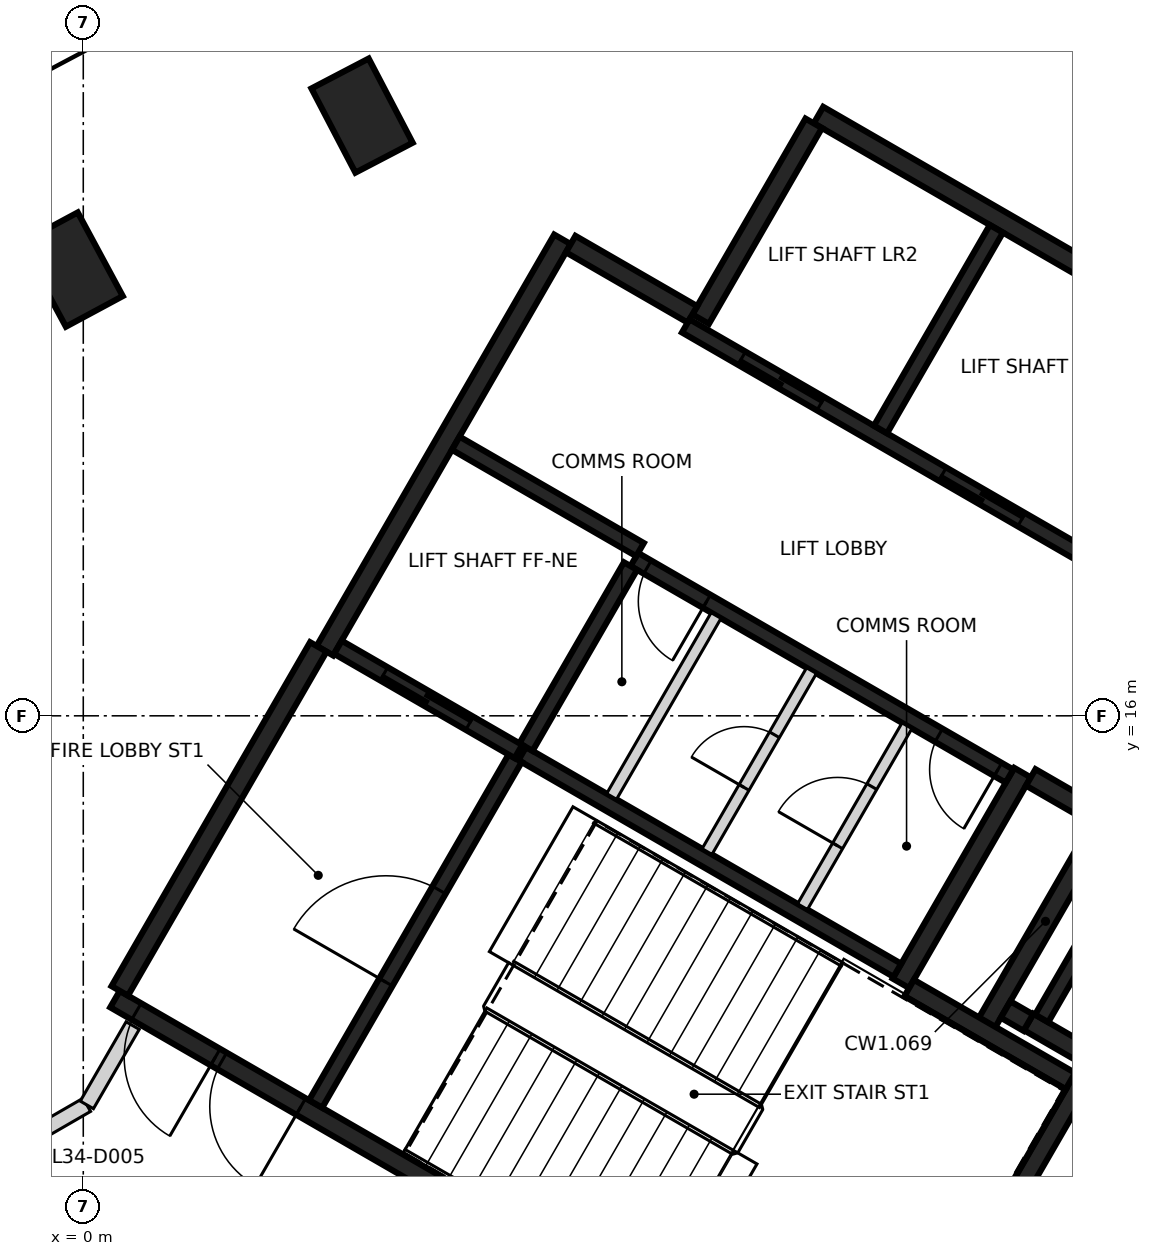
"""IFC4 building model, lengths in metres.
Left out: names, types, materials, properties, quantities, classifications, styles, units other than length and angle.
Written with IfcOpenShell. Run it as: python <this file> out.ifc"""

import sys

from ifc_helpers import new_model, si_unit, direction, frame, frame_2d, origin, origin_2d, place, context, subcontext, project, spatial, rectangle, extrude, element, fill, save


model = new_model("IFC4")
c1 = context("Model", 3, precision=1e-05, world=origin(), true_north=direction((0.0, 1.0)))
c2 = subcontext(c1, "Body", "Model", "MODEL_VIEW")
j1 = project(units=[si_unit("LENGTHUNIT", "METRE"), si_unit("PLANEANGLEUNIT", "RADIAN")], contexts=[c1])
p1 = place(None, origin())
s1 = spatial("IfcSite", under=j1, at=p1, CompositionType="ELEMENT")
p2 = place(p1, origin())
s2 = spatial("IfcBuilding", under=s1, at=p2, CompositionType="ELEMENT")
p3 = place(p2, frame((0.0, 0.0, 139.6)))
s3 = spatial("IfcBuildingStorey", under=s2, at=p3, CompositionType="ELEMENT", Elevation=139.6)
for number, where, z_axis, x_axis in (
    (1, (3.667, 23.896, -0.4), (0.0, 0.0, 1.0), (-0.463, 0.886, 0.0)),
    (2, (-0.151, 21.871, -0.4), (0.0, 0.0, 1.0), (-0.474, 0.881, 0.0)),
):
    element("IfcColumn", number, at=place(p3, frame(where, z_axis=z_axis, x_axis=x_axis)), inside=s3, PredefinedType="COLUMN", context=c2, shape_type="SweptSolid", body=[
        extrude(rectangle(XDim=1.25, YDim=0.85, at=origin_2d()), origin(), (0.0, 0.0, 1.0), 3.6),
    ])
p4 = place(p3, frame((15.207, 26.34, -0.4), z_axis=(0.0, 0.0, 1.0), x_axis=(0.5, 0.866025403784, 0.0)))
e3 = element("IfcColumn", 3, at=p4, inside=s3, PredefinedType="COLUMN", context=c2, shape_type="SweptSolid", body=[
    extrude(rectangle(XDim=3.6, YDim=3.0, at=origin_2d()), origin(), (0.0, 0.0, 1.0), 3.6),
])
p5 = place(p3, frame((10.42, 6.498, 0.0), z_axis=(0.0, 0.0, 1.0), x_axis=(-0.866021906294, 0.500006057782, 0.0)))
e4 = element("IfcWall", 4, at=p5, inside=s3, PredefinedType="SHEAR", context=c2, shape_type="SweptSolid", body=[
    extrude(rectangle(XDim=11.55, YDim=0.25, at=frame_2d((5.775, 0.0))), origin(), (0.0, 0.0, 1.0), 3.2),
])
p6 = place(p5, frame((10.025, 0.0, 0.0)))
e5 = element("IfcOpeningElement", 5, at=p6, cuts=e4, PredefinedType="OPENING", context=c2, shape_type="SweptSolid", body=[
    extrude(rectangle(XDim=1.2, YDim=2.1, at=frame_2d((0.6, 1.05))), frame((0.0, 0.135, 0.0), z_axis=(0.0, -1.0, 0.0), x_axis=(1.0, 0.0, 0.0)), (0.0, 0.0, 1.0), 0.27),
])
p7 = place(p5, frame((8.725, 0.0, 0.0)))
e6 = element("IfcOpeningElement", 6, at=p7, cuts=e4, PredefinedType="OPENING", context=c2, shape_type="SweptSolid", body=[
    extrude(rectangle(XDim=1.2, YDim=2.1, at=frame_2d((0.6, 1.05))), frame((0.0, 0.135, 0.0), z_axis=(0.0, -1.0, 0.0), x_axis=(1.0, 0.0, 0.0)), (0.0, 0.0, 1.0), 0.27),
])
p8 = place(p3, frame((3.179, 16.856, 0.0), z_axis=(0.0, 0.0, 1.0), x_axis=(0.500004234368, 0.866022959057, 0.0)))
e7 = element("IfcWall", 7, at=p8, inside=s3, PredefinedType="SHEAR", context=c2, shape_type="SweptSolid", body=[
    extrude(rectangle(XDim=6.25, YDim=0.25, at=frame_2d((3.125, 0.0))), origin(), (0.0, 0.0, 1.0), 3.2),
])
p9 = place(p3, frame((9.673, 23.903, 0.0), z_axis=(0.0, 0.0, 1.0), x_axis=(0.86603616409, -0.499981362141, 0.0)))
e8 = element("IfcWall", 8, at=p9, inside=s3, PredefinedType="SHEAR", context=c2, shape_type="SweptSolid", body=[
    extrude(rectangle(XDim=5.85, YDim=0.25, at=frame_2d((2.925, 0.0))), origin(), (0.0, 0.0, 1.0), 3.2),
])
p10 = place(p3, frame((0.48, 12.381, 0.0), z_axis=(0.0, 0.0, 1.0), x_axis=(0.49999885962, 0.866026062182, 0.0)))
e9 = element("IfcWall", 9, at=p10, inside=s3, PredefinedType="SHEAR", context=c2, shape_type="SweptSolid", body=[
    extrude(rectangle(XDim=5.225, YDim=0.25, at=frame_2d((2.612, 0.0))), origin(), (0.0, 0.0, 1.0), 3.2),
])
p11 = place(p3, frame((13.238, 11.378, 0.0), z_axis=(0.0, 0.0, 1.0), x_axis=(-0.500008851346, -0.866020293397, 0.0)))
e10 = element("IfcWall", 10, at=p11, inside=s3, PredefinedType="SHEAR", context=c2, shape_type="SweptSolid", body=[
    extrude(rectangle(XDim=5.51, YDim=0.25, at=frame_2d((2.755, 0.0))), origin(), (0.0, 0.0, 1.0), 3.2),
])
p12 = place(p3, frame((12.357, 15.252, 0.0), z_axis=(0.0, 0.0, 1.0), x_axis=(-0.500028443584, -0.866008981251, 0.0)))
e11 = element("IfcWall", 11, at=p12, inside=s3, PredefinedType="SHEAR", context=c2, shape_type="SweptSolid", body=[
    extrude(rectangle(XDim=3.2, YDim=0.25, at=frame_2d((1.6, 0.0))), origin(), (0.0, 0.0, 1.0), 3.2),
])
p13 = place(p3, frame((8.123, 21.219, 0.0), z_axis=(0.0, 0.0, 1.0), x_axis=(0.499987686533, 0.866032512851, 0.0)))
e12 = element("IfcWall", 12, at=p13, inside=s3, PredefinedType="SHEAR", context=c2, shape_type="SweptSolid", body=[
    extrude(rectangle(XDim=2.975, YDim=0.25, at=frame_2d((1.487, 0.0))), origin(), (0.0, 0.0, 1.0), 3.2),
])
p14 = place(p3, frame((14.918, 10.54, 0.0), z_axis=(0.0, 0.0, 1.0), x_axis=(-0.866063538972, 0.499933942099, 0.0)))
e13 = element("IfcWall", 13, at=p14, inside=s3, PredefinedType="SHEAR", context=c2, shape_type="SweptSolid", body=[
    extrude(rectangle(XDim=2.865, YDim=0.25, at=frame_2d((1.432, 0.0))), origin(), (0.0, 0.0, 1.0), 3.2),
])
p15 = place(p3, frame((11.888, 11.961, 0.0), z_axis=(0.0, 0.0, 1.0), x_axis=(0.500003324108, 0.866023484601, 0.0)))
e14 = element("IfcWall", 14, at=p15, inside=s3, PredefinedType="SHEAR", context=c2, shape_type="SweptSolid", body=[
    extrude(rectangle(XDim=3.085, YDim=0.25, at=frame_2d((1.542, 0.0))), origin(), (0.0, 0.0, 1.0), 3.2),
])
p16 = place(p3, frame((10.865, 12.418, 0.0), z_axis=(0.0, 0.0, 1.0), x_axis=(0.866026229868, -0.499998569178, 0.0)))
e15 = element("IfcWall", 15, at=p16, inside=s3, PredefinedType="SHEAR", context=c2, shape_type="SweptSolid", body=[
    extrude(rectangle(XDim=2.449, YDim=0.25, at=frame_2d((1.225, 0.0))), origin(), (0.0, 0.0, 1.0), 3.2),
])
p17 = place(p3, frame((6.413, 22.206, 0.0), z_axis=(0.0, 0.0, 1.0), x_axis=(0.866016279763, -0.500015802937, 0.0)))
e16 = element("IfcWall", 16, at=p17, inside=s3, PredefinedType="SHEAR", context=c2, shape_type="SweptSolid", body=[
    extrude(rectangle(XDim=1.849, YDim=0.25, at=frame_2d((0.925, 0.0))), origin(), (0.0, 0.0, 1.0), 3.2),
])
p18 = place(p3, frame((13.322, 14.695, 0.0), z_axis=(0.0, 0.0, 1.0), x_axis=(-0.866017078145, 0.500014420154, 0.0)))
e17 = element("IfcWall", 17, at=p18, inside=s3, PredefinedType="SHEAR", context=c2, shape_type="SweptSolid", body=[
    extrude(rectangle(XDim=0.989, YDim=0.25, at=frame_2d((0.495, 0.0))), origin(), (0.0, 0.0, 1.0), 3.2),
])
p19 = place(p3, frame((12.433, 11.964, 0.0), z_axis=(0.0, 0.0, 1.0), x_axis=(-0.866055875208, 0.499947218231, 0.0)))
e18 = element("IfcWall", 18, at=p19, inside=s3, PredefinedType="SHEAR", context=c2, shape_type="SweptSolid", body=[
    extrude(rectangle(XDim=0.345, YDim=0.25, at=frame_2d((0.172, 0.0))), origin(), (0.0, 0.0, 1.0), 3.2),
])
p20 = place(p3, frame((13.21, 18.08, 0.0), z_axis=(0.0, 0.0, 1.0), x_axis=(-0.866030299012, 0.499991521122, 0.0)))
e19 = element("IfcWall", 19, at=p20, inside=s3, PredefinedType="SHEAR", context=c2, shape_type="SweptSolid", body=[
    extrude(rectangle(XDim=6.1, YDim=0.2, at=frame_2d((3.05, 0.0))), origin(), (0.0, 0.0, 1.0), 3.2),
])
p21 = place(p20, frame((1.0, 0.0, 0.0)))
e20 = element("IfcOpeningElement", 20, at=p21, cuts=e19, PredefinedType="OPENING", context=c2, shape_type="SweptSolid", body=[
    extrude(rectangle(XDim=1.2, YDim=2.1, at=frame_2d((0.6, 1.05))), frame((0.0, 0.11, 0.0), z_axis=(0.0, -1.0, 0.0), x_axis=(1.0, 0.0, 0.0)), (0.0, 0.0, 1.0), 0.22),
])
p22 = place(p20, frame((4.05, 0.0, 0.0)))
e21 = element("IfcOpeningElement", 21, at=p22, cuts=e19, PredefinedType="OPENING", context=c2, shape_type="SweptSolid", body=[
    extrude(rectangle(XDim=1.2, YDim=2.1, at=frame_2d((0.6, 1.05))), frame((0.0, 0.11, 0.0), z_axis=(0.0, -1.0, 0.0), x_axis=(1.0, 0.0, 0.0)), (0.0, 0.0, 1.0), 0.22),
])
p23 = place(p3, frame((5.775, 15.502, 0.0), z_axis=(0.0, 0.0, 1.0), x_axis=(0.866020080793, -0.500009219579, 0.0)))
e22 = element("IfcWall", 22, at=p23, inside=s3, PredefinedType="SHEAR", context=c2, shape_type="SweptSolid", body=[
    extrude(rectangle(XDim=5.699, YDim=0.2, at=frame_2d((2.85, 0.0))), origin(), (0.0, 0.0, 1.0), 3.2),
])
p24 = place(p3, frame((12.185, 15.207, 0.0), z_axis=(0.0, 0.0, 1.0), x_axis=(-0.866020080793, 0.500009219579, 0.0)))
e23 = element("IfcWall", 23, at=p24, inside=s3, PredefinedType="SHEAR", context=c2, shape_type="SweptSolid", body=[
    extrude(rectangle(XDim=5.699, YDim=0.2, at=frame_2d((2.85, 0.0))), origin(), (0.0, 0.0, 1.0), 3.2),
])
p25 = place(p24, frame((0.174, 0.0, 0.0)))
e24 = element("IfcOpeningElement", 24, at=p25, cuts=e23, PredefinedType="OPENING", context=c2, shape_type="SweptSolid", body=[
    extrude(rectangle(XDim=0.9, YDim=2.1, at=frame_2d((0.45, 1.05))), frame((0.0, 0.11, 0.0), z_axis=(0.0, -1.0, 0.0), x_axis=(1.0, 0.0, 0.0)), (0.0, 0.0, 1.0), 0.22),
])
p26 = place(p24, frame((4.599, 0.0, 0.0)))
e25 = element("IfcOpeningElement", 25, at=p26, cuts=e23, PredefinedType="OPENING", context=c2, shape_type="SweptSolid", body=[
    extrude(rectangle(XDim=0.9, YDim=2.1, at=frame_2d((0.45, 1.05))), frame((0.0, 0.11, 0.0), z_axis=(0.0, -1.0, 0.0), x_axis=(1.0, 0.0, 0.0)), (0.0, 0.0, 1.0), 0.22),
])
p27 = place(p3, frame((3.057, 10.895, 0.0), z_axis=(0.0, 0.0, 1.0), x_axis=(0.499989418164, 0.866031513124, 0.0)))
e26 = element("IfcWall", 26, at=p27, inside=s3, PredefinedType="SHEAR", context=c2, shape_type="SweptSolid", body=[
    extrude(rectangle(XDim=5.251, YDim=0.2, at=frame_2d((2.625, 0.0))), origin(), (0.0, 0.0, 1.0), 3.2),
])
p28 = place(p27, frame((1.849, 0.0, 0.0)))
e27 = element("IfcOpeningElement", 27, at=p28, cuts=e26, PredefinedType="OPENING", context=c2, shape_type="SweptSolid", body=[
    extrude(rectangle(XDim=1.4, YDim=2.1, at=frame_2d((0.7, 1.05))), frame((0.0, 0.11, 0.0), z_axis=(0.0, -1.0, 0.0), x_axis=(1.0, 0.0, 0.0)), (0.0, 0.0, 1.0), 0.22),
])
p29 = place(p3, frame((10.489, 19.767, 0.0), z_axis=(0.0, 0.0, 1.0), x_axis=(0.499946628782, 0.866056215479, 0.0)))
e28 = element("IfcWall", 28, at=p29, inside=s3, PredefinedType="SHEAR", context=c2, shape_type="SweptSolid", body=[
    extrude(rectangle(XDim=3.048, YDim=0.2, at=frame_2d((1.524, 0.0))), origin(), (0.0, 0.0, 1.0), 3.2),
])
p30 = place(p3, frame((14.008, 14.442, 0.0), z_axis=(0.0, 0.0, 1.0), x_axis=(-0.499986818241, -0.866033014143, 0.0)))
e29 = element("IfcWall", 29, at=p30, inside=s3, PredefinedType="SHEAR", context=c2, shape_type="SweptSolid", body=[
    extrude(rectangle(XDim=2.798, YDim=0.2, at=frame_2d((1.399, 0.0))), origin(), (0.0, 0.0, 1.0), 3.2),
])
p31 = place(p30, frame((0.949, 0.0, 0.0)))
e30 = element("IfcOpeningElement", 30, at=p31, cuts=e29, PredefinedType="OPENING", context=c2, shape_type="SweptSolid", body=[
    extrude(rectangle(XDim=0.9, YDim=2.1, at=frame_2d((0.45, 1.05))), frame((0.0, 0.11, 0.0), z_axis=(0.0, -1.0, 0.0), x_axis=(1.0, 0.0, 0.0)), (0.0, 0.0, 1.0), 0.22),
])
p32 = place(p3, frame((7.199, 17.97, 0.0), z_axis=(0.0, 0.0, 1.0), x_axis=(-0.499968400327, -0.866043647095, 0.0)))
e31 = element("IfcWall", 31, at=p32, inside=s3, PredefinedType="SHEAR", context=c2, shape_type="SweptSolid", body=[
    extrude(rectangle(XDim=2.75, YDim=0.2, at=frame_2d((1.375, 0.0))), origin(), (0.0, 0.0, 1.0), 3.2),
])
p33 = place(p3, frame((5.725, 15.531, 0.0), z_axis=(0.0, 0.0, 1.0), x_axis=(-0.866037306777, 0.499979382845, 0.0)))
e32 = element("IfcWall", 32, at=p33, inside=s3, PredefinedType="SHEAR", context=c2, shape_type="SweptSolid", body=[
    extrude(rectangle(XDim=2.742, YDim=0.2, at=frame_2d((1.371, 0.0))), origin(), (0.0, 0.0, 1.0), 3.2),
])
p34 = place(p33, frame((0.743, 0.0, 0.0)))
e33 = element("IfcOpeningElement", 33, at=p34, cuts=e32, PredefinedType="OPENING", context=c2, shape_type="SweptSolid", body=[
    extrude(rectangle(XDim=1.3, YDim=2.1, at=frame_2d((0.65, 1.05))), frame((0.0, 0.11, 0.0), z_axis=(0.0, -1.0, 0.0), x_axis=(1.0, 0.0, 0.0)), (0.0, 0.0, 1.0), 0.22),
])
p35 = place(p3, frame((4.901, 19.586, 0.0), z_axis=(0.0, 0.0, 1.0), x_axis=(0.866022890907, -0.500004352405, 0.0)))
e34 = element("IfcWall", 34, at=p35, inside=s3, PredefinedType="SHEAR", context=c2, shape_type="SweptSolid", body=[
    extrude(rectangle(XDim=2.799, YDim=0.2, at=frame_2d((1.399, 0.0))), origin(), (0.0, 0.0, 1.0), 3.2),
])
p36 = place(p3, frame((9.462, 13.489, 0.0), z_axis=(0.0, 0.0, 1.0), x_axis=(0.50002746344, 0.86600954718, 0.0)))
e35 = element("IfcWall", 35, at=p36, inside=s3, PredefinedType="PARTITIONING", context=c2, shape_type="SweptSolid", body=[
    extrude(rectangle(XDim=2.748, YDim=0.15, at=frame_2d((1.374, 0.0))), origin(), (0.0, 0.0, 1.0), 3.2),
])
p37 = place(p36, frame((0.924, 0.0, 0.0)))
e36 = element("IfcOpeningElement", 36, at=p37, cuts=e35, PredefinedType="OPENING", context=c2, shape_type="SweptSolid", body=[
    extrude(rectangle(XDim=0.9, YDim=2.1, at=frame_2d((0.45, 1.05))), frame((0.0, 0.085, 0.0), z_axis=(0.0, -1.0, 0.0), x_axis=(1.0, 0.0, 0.0)), (0.0, 0.0, 1.0), 0.17),
])
p38 = place(p3, frame((8.207, 14.214, 0.0), z_axis=(0.0, 0.0, 1.0), x_axis=(0.499922376475, 0.866070215109, 0.0)))
e37 = element("IfcWall", 37, at=p38, inside=s3, PredefinedType="PARTITIONING", context=c2, shape_type="SweptSolid", body=[
    extrude(rectangle(XDim=2.749, YDim=0.15, at=frame_2d((1.374, 0.0))), origin(), (0.0, 0.0, 1.0), 3.2),
])
p39 = place(p38, frame((0.974, 0.0, 0.0)))
e38 = element("IfcOpeningElement", 38, at=p39, cuts=e37, PredefinedType="OPENING", context=c2, shape_type="SweptSolid", body=[
    extrude(rectangle(XDim=0.8, YDim=2.1, at=frame_2d((0.4, 1.05))), frame((0.0, 0.085, 0.0), z_axis=(0.0, -1.0, 0.0), x_axis=(1.0, 0.0, 0.0)), (0.0, 0.0, 1.0), 0.17),
])
p40 = place(p3, frame((6.951, 14.939, 0.0), z_axis=(0.0, 0.0, 1.0), x_axis=(0.50002746344, 0.86600954718, 0.0)))
e39 = element("IfcWall", 39, at=p40, inside=s3, PredefinedType="PARTITIONING", context=c2, shape_type="SweptSolid", body=[
    extrude(rectangle(XDim=2.748, YDim=0.15, at=frame_2d((1.374, 0.0))), origin(), (0.0, 0.0, 1.0), 3.2),
])
p41 = place(p3, frame((-8.161, 6.142, 0.0), z_axis=(0.0, 0.0, 1.0), x_axis=(0.865927304867, 0.500169873828, 0.0)))
e40 = element("IfcWall", 40, at=p41, inside=s3, PredefinedType="PARTITIONING", context=c2, shape_type="SweptSolid", body=[
    extrude(rectangle(XDim=9.478, YDim=0.2, at=frame_2d((4.739, 0.0))), origin(), (0.0, 0.0, 1.0), 3.2),
])
p42 = place(p41, frame((4.851, 0.0, 0.0)))
e41 = element("IfcOpeningElement", 41, at=p42, cuts=e40, PredefinedType="OPENING", context=c2, shape_type="SweptSolid", body=[
    extrude(rectangle(XDim=1.0, YDim=2.1, at=frame_2d((0.5, 1.05))), frame((0.0, 0.11, 0.0), z_axis=(0.0, -1.0, 0.0), x_axis=(1.0, 0.0, 0.0)), (0.0, 0.0, 1.0), 0.22),
])
p43 = place(p41, frame((7.583, 0.0, 0.0)))
e42 = element("IfcOpeningElement", 42, at=p43, cuts=e40, PredefinedType="OPENING", context=c2, shape_type="SweptSolid", body=[
    extrude(rectangle(XDim=1.0, YDim=2.1, at=frame_2d((0.5, 1.05))), frame((0.0, 0.11, 0.0), z_axis=(0.0, -1.0, 0.0), x_axis=(1.0, 0.0, 0.0)), (0.0, 0.0, 1.0), 0.22),
])
p44 = place(p3, frame((0.047, 10.881, 0.0), z_axis=(0.0, 0.0, 1.0), x_axis=(0.500038011057, 0.866003456978, 0.0)))
e43 = element("IfcWall", 43, at=p44, inside=s3, PredefinedType="PARTITIONING", context=c2, shape_type="SweptSolid", body=[
    extrude(rectangle(XDim=1.206, YDim=0.2, at=frame_2d((0.603, 0.0))), origin(), (0.0, 0.0, 1.0), 3.2),
])
p45 = place(p3, frame((12.433, 4.992, 0.0), z_axis=(0.0, 0.0, 1.0), x_axis=(0.492740203499, 0.870176471675, 0.0)))
e44 = element("IfcWall", 44, at=p45, inside=s3, PredefinedType="PARTITIONING", context=c2, shape_type="SweptSolid", body=[
    extrude(rectangle(XDim=6.265, YDim=0.2, at=frame_2d((3.133, 0.0))), origin(), (0.0, 0.0, 1.0), 3.2),
])
p46 = place(p45, frame((2.858, 0.0, 0.0)))
e45 = element("IfcOpeningElement", 45, at=p46, cuts=e44, PredefinedType="OPENING", context=c2, shape_type="SweptSolid", body=[
    extrude(rectangle(XDim=1.0, YDim=2.1, at=frame_2d((0.5, 1.05))), frame((0.0, 0.11, 0.0), z_axis=(0.0, -1.0, 0.0), x_axis=(1.0, 0.0, 0.0)), (0.0, 0.0, 1.0), 0.22),
])
p47 = place(p34, origin())
e46 = element("IfcDoor", 46, at=p47, inside=s3, OperationType="SLIDING_TO_RIGHT", PredefinedType="DOOR", context=c2, shape_type="SweptSolid", body=[
    extrude(rectangle(XDim=1.3, YDim=2.1, at=frame_2d((0.65, 1.05))), frame((0.0, 0.025, 0.0), z_axis=(0.0, -1.0, 0.0), x_axis=(1.0, 0.0, 0.0)), (0.0, 0.0, 1.0), 0.05),
])
fill(e33, e46)
p48 = place(p21, origin())
e47 = element("IfcDoor", 47, at=p48, inside=s3, OperationType="DOUBLE_DOOR_SLIDING", PredefinedType="DOOR", context=c2, shape_type="SweptSolid", body=[
    extrude(rectangle(XDim=1.2, YDim=2.1, at=frame_2d((0.6, 1.05))), frame((0.0, 0.025, 0.0), z_axis=(0.0, -1.0, 0.0), x_axis=(1.0, 0.0, 0.0)), (0.0, 0.0, 1.0), 0.05),
])
fill(e20, e47)
p49 = place(p22, origin())
e48 = element("IfcDoor", 48, at=p49, inside=s3, OperationType="DOUBLE_DOOR_SLIDING", PredefinedType="DOOR", context=c2, shape_type="SweptSolid", body=[
    extrude(rectangle(XDim=1.2, YDim=2.1, at=frame_2d((0.6, 1.05))), frame((0.0, 0.025, 0.0), z_axis=(0.0, -1.0, 0.0), x_axis=(1.0, 0.0, 0.0)), (0.0, 0.0, 1.0), 0.05),
])
fill(e21, e48)
p50 = place(p6, origin())
e49 = element("IfcDoor", 49, at=p50, inside=s3, OperationType="SINGLE_SWING_LEFT", PredefinedType="DOOR", context=c2, shape_type="SweptSolid", body=[
    extrude(rectangle(XDim=1.2, YDim=2.1, at=frame_2d((0.6, 1.05))), frame((0.0, 0.025, 0.0), z_axis=(0.0, -1.0, 0.0), x_axis=(1.0, 0.0, 0.0)), (0.0, 0.0, 1.0), 0.05),
])
fill(e5, e49)
p51 = place(p7, origin())
e50 = element("IfcDoor", 50, at=p51, inside=s3, OperationType="SINGLE_SWING_RIGHT", PredefinedType="DOOR", context=c2, shape_type="SweptSolid", body=[
    extrude(rectangle(XDim=1.2, YDim=2.1, at=frame_2d((0.6, 1.05))), frame((0.0, 0.025, 0.0), z_axis=(0.0, -1.0, 0.0), x_axis=(1.0, 0.0, 0.0)), (0.0, 0.0, 1.0), 0.05),
])
fill(e6, e50)
p52 = place(p28, origin())
e51 = element("IfcDoor", 51, at=p52, inside=s3, OperationType="SINGLE_SWING_RIGHT", PredefinedType="DOOR", context=c2, shape_type="SweptSolid", body=[
    extrude(rectangle(XDim=1.4, YDim=2.1, at=frame_2d((0.7, 1.05))), frame((0.0, 0.025, 0.0), z_axis=(0.0, -1.0, 0.0), x_axis=(1.0, 0.0, 0.0)), (0.0, 0.0, 1.0), 0.05),
])
fill(e27, e51)
p53 = place(p25, origin())
e52 = element("IfcDoor", 52, at=p53, inside=s3, OperationType="SINGLE_SWING_LEFT", PredefinedType="DOOR", context=c2, shape_type="SweptSolid", body=[
    extrude(rectangle(XDim=0.9, YDim=2.1, at=frame_2d((0.45, 1.05))), frame((0.0, 0.025, 0.0), z_axis=(0.0, -1.0, 0.0), x_axis=(1.0, 0.0, 0.0)), (0.0, 0.0, 1.0), 0.05),
])
fill(e24, e52)
p54 = place(p37, origin())
e53 = element("IfcDoor", 53, at=p54, inside=s3, OperationType="SINGLE_SWING_RIGHT", PredefinedType="DOOR", context=c2, shape_type="SweptSolid", body=[
    extrude(rectangle(XDim=0.9, YDim=2.1, at=frame_2d((0.45, 1.05))), frame((0.0, 0.025, 0.0), z_axis=(0.0, -1.0, 0.0), x_axis=(1.0, 0.0, 0.0)), (0.0, 0.0, 1.0), 0.05),
])
fill(e36, e53)
p55 = place(p39, origin())
e54 = element("IfcDoor", 54, at=p55, inside=s3, OperationType="SINGLE_SWING_LEFT", PredefinedType="DOOR", context=c2, shape_type="SweptSolid", body=[
    extrude(rectangle(XDim=0.8, YDim=2.1, at=frame_2d((0.4, 1.05))), frame((0.0, 0.025, 0.0), z_axis=(0.0, -1.0, 0.0), x_axis=(1.0, 0.0, 0.0)), (0.0, 0.0, 1.0), 0.05),
])
fill(e38, e54)
p56 = place(p26, origin())
e55 = element("IfcDoor", 55, at=p56, inside=s3, OperationType="SINGLE_SWING_RIGHT", PredefinedType="DOOR", context=c2, shape_type="SweptSolid", body=[
    extrude(rectangle(XDim=0.9, YDim=2.1, at=frame_2d((0.45, 1.05))), frame((0.0, 0.025, 0.0), z_axis=(0.0, -1.0, 0.0), x_axis=(1.0, 0.0, 0.0)), (0.0, 0.0, 1.0), 0.05),
])
fill(e25, e55)
save(model, sys.argv[1])
